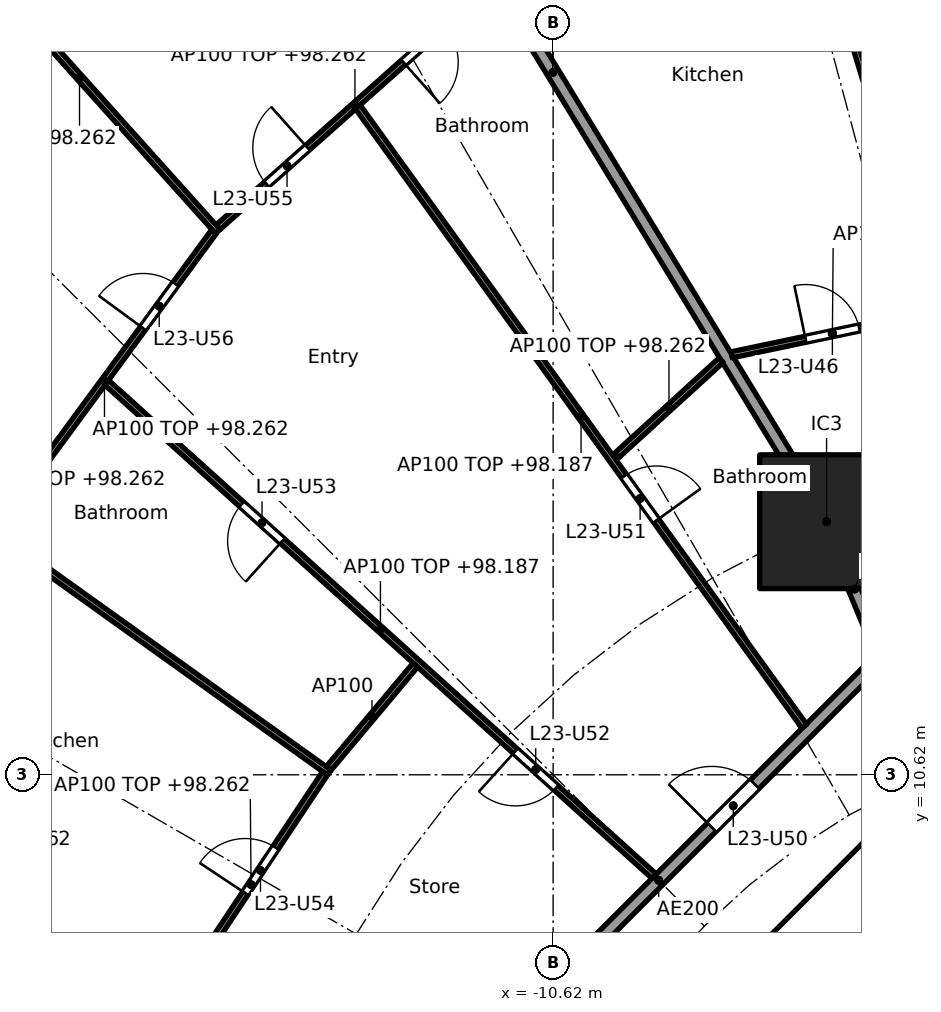
"""IFC4 building model, lengths in metres.
Left out: names, types, materials, properties, quantities, classifications, styles, units other than length and angle.
Written with IfcOpenShell. Run it as: python <this file> out.ifc"""

import sys

from ifc_helpers import new_model, si_unit, direction, frame, frame_2d, origin, origin_2d, place, context, subcontext, project, spatial, rectangle, extrude, element, fill, save


model = new_model("IFC4")
c1 = context("Model", 3, precision=1e-05, world=origin(), true_north=direction((0.0, 1.0)))
c2 = subcontext(c1, "Body", "Model", "MODEL_VIEW")
j1 = project(units=[si_unit("LENGTHUNIT", "METRE"), si_unit("PLANEANGLEUNIT", "RADIAN")], contexts=[c1])
p1 = place(None, origin())
s1 = spatial("IfcSite", under=j1, at=p1, CompositionType="ELEMENT")
p2 = place(p1, origin())
s2 = spatial("IfcBuilding", under=s1, at=p2, CompositionType="ELEMENT")
p3 = place(p2, frame((0.0, 0.0, 95.5)))
s3 = spatial("IfcBuildingStorey", under=s2, at=p3, CompositionType="ELEMENT", Elevation=95.5)
p4 = place(p3, frame((-6.123, 14.782, 0.0), z_axis=(0.0, 0.0, 1.0), x_axis=(1.0, 0.0, 0.0)))
e1 = element("IfcColumn", 1, at=p4, inside=s3, PredefinedType="COLUMN", context=c2, shape_type="SweptSolid", body=[
    extrude(rectangle(XDim=2.2, YDim=2.2, at=origin_2d()), origin(), (0.0, 0.0, 1.0), 3.7),
])
p5 = place(p3, frame((-4.613, 9.988, 0.0), z_axis=(0.0, 0.0, 1.0), x_axis=(-0.707106781187, -0.707106781187, 0.0)))
e2 = element("IfcWall", 2, at=p5, inside=s3, PredefinedType="SHEAR", context=c2, shape_type="SweptSolid", body=[
    extrude(rectangle(XDim=7.602, YDim=0.6, at=frame_2d((3.801, 0.0))), origin(), (0.0, 0.0, 1.0), 3.44),
])
p6 = place(p5, frame((0.351, 0.0, 0.0)))
e3 = element("IfcOpeningElement", 3, at=p6, cuts=e2, PredefinedType="OPENING", context=c2, shape_type="SweptSolid", body=[
    extrude(rectangle(XDim=1.1, YDim=2.1, at=frame_2d((0.55, 1.05))), frame((0.0, 0.31, 0.0), z_axis=(0.0, -1.0, 0.0), x_axis=(1.0, 0.0, 0.0)), (0.0, 0.0, 1.0), 0.62),
])
p7 = place(p3, frame((-5.243, 12.657, 0.0), z_axis=(0.0, 0.0, 1.0), x_axis=(-0.38273085373, 0.923859888513, 0.0)))
e4 = element("IfcWall", 4, at=p7, inside=s3, PredefinedType="PARTITIONING", context=c2, shape_type="SweptSolid", body=[
    extrude(rectangle(XDim=2.199, YDim=0.2, at=frame_2d((1.1, 0.0))), origin(), (0.0, 0.0, 1.0), 3.44),
])
p8 = place(p3, frame((-6.149, 14.825, 0.0), z_axis=(0.0, 0.0, 1.0), x_axis=(-0.520412862249, 0.853914780763, 0.0)))
e5 = element("IfcWall", 5, at=p8, inside=s3, PredefinedType="PARTITIONING", context=c2, shape_type="SweptSolid", body=[
    extrude(rectangle(XDim=17.202, YDim=0.2, at=frame_2d((8.601, 0.0))), origin(), (0.0, 0.0, 1.0), 2.762),
])
p9 = place(p3, frame((-14.829, 6.14, 0.0), z_axis=(0.0, 0.0, 1.0), x_axis=(-0.936597324342, 0.35040755134, 0.0)))
e6 = element("IfcWall", 6, at=p9, inside=s3, PredefinedType="PARTITIONING", context=c2, shape_type="SweptSolid", body=[
    extrude(rectangle(XDim=13.606, YDim=0.2, at=frame_2d((6.803, 0.0))), origin(), (0.0, 0.0, 1.0), 2.762),
])
p10 = place(p3, frame((-5.275, 12.494, 0.0), z_axis=(0.0, 0.0, 1.0), x_axis=(-0.707106781187, -0.707106781187, 0.0)))
e7 = element("IfcWall", 7, at=p10, inside=s3, PredefinedType="PARTITIONING", context=c2, shape_type="SweptSolid", body=[
    extrude(rectangle(XDim=10.209, YDim=0.2, at=frame_2d((5.104, 0.0))), origin(), (0.0, 0.0, 1.0), 3.44),
])
p11 = place(p10, frame((2.87, 0.0, 0.0)))
e8 = element("IfcOpeningElement", 8, at=p11, cuts=e7, PredefinedType="OPENING", context=c2, shape_type="SweptSolid", body=[
    extrude(rectangle(XDim=1.0, YDim=2.1, at=frame_2d((0.5, 1.05))), frame((0.0, 0.11, 0.0), z_axis=(0.0, -1.0, 0.0), x_axis=(1.0, 0.0, 0.0)), (0.0, 0.0, 1.0), 0.22),
])
p12 = place(p3, frame((-4.306, 18.185, 0.0), z_axis=(0.0, 0.0, 1.0), x_axis=(-0.290183838394, 0.956970919064, 0.0)))
e9 = element("IfcWall", 9, at=p12, inside=s3, PredefinedType="PARTITIONING", context=c2, shape_type="SweptSolid", body=[
    extrude(rectangle(XDim=15.015, YDim=0.1, at=frame_2d((7.508, 0.0))), origin(), (0.0, 0.0, 1.0), 2.762),
])
p13 = place(p12, frame((10.922, 0.0, 0.0)))
e10 = element("IfcOpeningElement", 10, at=p13, cuts=e9, PredefinedType="OPENING", context=c2, shape_type="SweptSolid", body=[
    extrude(rectangle(XDim=0.9, YDim=2.1, at=frame_2d((0.45, 1.05))), frame((0.0, 0.06, 0.0), z_axis=(0.0, -1.0, 0.0), x_axis=(1.0, 0.0, 0.0)), (0.0, 0.0, 1.0), 0.12),
])
p14 = place(p3, frame((-4.37, 18.223, 0.0), z_axis=(0.0, 0.0, 1.0), x_axis=(-0.978633053291, -0.205614559323, 0.0)))
e11 = element("IfcWall", 11, at=p14, inside=s3, PredefinedType="PARTITIONING", context=c2, shape_type="SweptSolid", body=[
    extrude(rectangle(XDim=3.387, YDim=0.1, at=frame_2d((1.694, 0.0))), origin(), (0.0, 0.0, 1.0), 2.762),
])
p15 = place(p14, frame((1.244, 0.0, 0.0)))
e12 = element("IfcOpeningElement", 12, at=p15, cuts=e11, PredefinedType="OPENING", context=c2, shape_type="SweptSolid", body=[
    extrude(rectangle(XDim=0.9, YDim=2.1, at=frame_2d((0.45, 1.05))), frame((0.0, 0.06, 0.0), z_axis=(0.0, -1.0, 0.0), x_axis=(1.0, 0.0, 0.0)), (0.0, 0.0, 1.0), 0.12),
])
p16 = place(p3, frame((-7.857, 17.438, 0.0), z_axis=(0.0, 0.0, 1.0), x_axis=(-0.738883513135, -0.673833179665, 0.0)))
e13 = element("IfcWall", 13, at=p16, inside=s3, PredefinedType="PARTITIONING", context=c2, shape_type="SweptSolid", body=[
    extrude(rectangle(XDim=2.323, YDim=0.1, at=frame_2d((1.162, 0.0))), origin(), (0.0, 0.0, 1.0), 2.762),
])
p17 = place(p3, frame((-11.628, 23.626, 0.0), z_axis=(0.0, 0.0, 1.0), x_axis=(-0.747429444005, -0.664341197153, 0.0)))
e14 = element("IfcWall", 14, at=p17, inside=s3, PredefinedType="PARTITIONING", context=c2, shape_type="SweptSolid", body=[
    extrude(rectangle(XDim=6.024, YDim=0.1, at=frame_2d((3.012, 0.0))), origin(), (0.0, 0.0, 1.0), 2.762),
])
p18 = place(p17, frame((4.055, 0.0, 0.0)))
e15 = element("IfcOpeningElement", 15, at=p18, cuts=e14, PredefinedType="OPENING", context=c2, shape_type="SweptSolid", body=[
    extrude(rectangle(XDim=0.9, YDim=2.1, at=frame_2d((0.45, 1.05))), frame((0.0, 0.06, 0.0), z_axis=(0.0, -1.0, 0.0), x_axis=(1.0, 0.0, 0.0)), (0.0, 0.0, 1.0), 0.12),
])
p19 = place(p17, frame((1.043, 0.0, 0.0)))
e16 = element("IfcOpeningElement", 16, at=p19, cuts=e14, PredefinedType="OPENING", context=c2, shape_type="SweptSolid", body=[
    extrude(rectangle(XDim=0.9, YDim=2.1, at=frame_2d((0.45, 1.05))), frame((0.0, 0.06, 0.0), z_axis=(0.0, -1.0, 0.0), x_axis=(1.0, 0.0, 0.0)), (0.0, 0.0, 1.0), 0.12),
])
p20 = place(p3, frame((-6.49, 11.419, 0.0), z_axis=(0.0, 0.0, 1.0), x_axis=(-0.584832823883, 0.811153849839, 0.0)))
e17 = element("IfcWall", 17, at=p20, inside=s3, PredefinedType="PARTITIONING", context=c2, shape_type="SweptSolid", body=[
    extrude(rectangle(XDim=12.553, YDim=0.1, at=frame_2d((6.277, 0.0))), origin(), (0.0, 0.0, 1.0), 2.687),
])
p21 = place(p20, frame((4.166, 0.0, 0.0)))
e18 = element("IfcOpeningElement", 18, at=p21, cuts=e17, PredefinedType="OPENING", context=c2, shape_type="SweptSolid", body=[
    extrude(rectangle(XDim=0.9, YDim=2.1, at=frame_2d((0.45, 1.05))), frame((0.0, 0.06, 0.0), z_axis=(0.0, -1.0, 0.0), x_axis=(1.0, 0.0, 0.0)), (0.0, 0.0, 1.0), 0.12),
])
p22 = place(p3, frame((-16.134, 19.554, 0.0), z_axis=(0.0, 0.0, 1.0), x_axis=(-0.667985610263, 0.74417418961, 0.0)))
e19 = element("IfcWall", 19, at=p22, inside=s3, PredefinedType="PARTITIONING", context=c2, shape_type="SweptSolid", body=[
    extrude(rectangle(XDim=6.809, YDim=0.1, at=frame_2d((3.405, 0.0))), origin(), (0.0, 0.0, 1.0), 2.762),
])
p23 = place(p3, frame((-16.197, 19.551, 0.0), z_axis=(0.0, 0.0, 1.0), x_axis=(-0.592391983588, -0.80564988536, 0.0)))
e20 = element("IfcWall", 20, at=p23, inside=s3, PredefinedType="PARTITIONING", context=c2, shape_type="SweptSolid", body=[
    extrude(rectangle(XDim=6.08, YDim=0.1, at=frame_2d((3.04, 0.0))), origin(), (0.0, 0.0, 1.0), 2.762),
])
p24 = place(p23, frame((1.07, 0.0, 0.0)))
e21 = element("IfcOpeningElement", 21, at=p24, cuts=e20, PredefinedType="OPENING", context=c2, shape_type="SweptSolid", body=[
    extrude(rectangle(XDim=0.9, YDim=2.1, at=frame_2d((0.45, 1.05))), frame((0.0, 0.06, 0.0), z_axis=(0.0, -1.0, 0.0), x_axis=(1.0, 0.0, 0.0)), (0.0, 0.0, 1.0), 0.12),
])
p25 = place(p3, frame((-8.959, 8.952, 0.0), z_axis=(0.0, 0.0, 1.0), x_axis=(-0.742679904999, 0.669646592398, 0.0)))
e22 = element("IfcWall", 22, at=p25, inside=s3, PredefinedType="PARTITIONING", context=c2, shape_type="SweptSolid", body=[
    extrude(rectangle(XDim=12.121, YDim=0.1, at=frame_2d((6.061, 0.0))), origin(), (0.0, 0.0, 1.0), 2.687),
])
p26 = place(p25, frame((2.172, 0.0, 0.0)))
e23 = element("IfcOpeningElement", 23, at=p26, cuts=e22, PredefinedType="OPENING", context=c2, shape_type="SweptSolid", body=[
    extrude(rectangle(XDim=0.9, YDim=2.1, at=frame_2d((0.45, 1.05))), frame((0.0, 0.06, 0.0), z_axis=(0.0, -1.0, 0.0), x_axis=(1.0, 0.0, 0.0)), (0.0, 0.0, 1.0), 0.12),
])
p27 = place(p25, frame((8.233, 0.0, 0.0)))
e24 = element("IfcOpeningElement", 24, at=p27, cuts=e22, PredefinedType="OPENING", context=c2, shape_type="SweptSolid", body=[
    extrude(rectangle(XDim=0.9, YDim=2.1, at=frame_2d((0.45, 1.05))), frame((0.0, 0.06, 0.0), z_axis=(0.0, -1.0, 0.0), x_axis=(1.0, 0.0, 0.0)), (0.0, 0.0, 1.0), 0.12),
])
p28 = place(p3, frame((-12.885, 12.425, 0.0), z_axis=(0.0, 0.0, 1.0), x_axis=(-0.642551826067, -0.766242227248, 0.0)))
e25 = element("IfcWall", 25, at=p28, inside=s3, PredefinedType="PARTITIONING", context=c2, shape_type="SweptSolid", body=[
    extrude(rectangle(XDim=2.219, YDim=0.1, at=frame_2d((1.109, 0.0))), origin(), (0.0, 0.0, 1.0), 3.44),
])
p29 = place(p3, frame((-14.302, 10.657, 0.0), z_axis=(0.0, 0.0, 1.0), x_axis=(-0.813183002698, 0.582008079087, 0.0)))
e26 = element("IfcWall", 26, at=p29, inside=s3, PredefinedType="PARTITIONING", context=c2, shape_type="SweptSolid", body=[
    extrude(rectangle(XDim=13.074, YDim=0.1, at=frame_2d((6.537, 0.0))), origin(), (0.0, 0.0, 1.0), 2.762),
])
p30 = place(p29, frame((9.485, 0.0, 0.0)))
e27 = element("IfcOpeningElement", 27, at=p30, cuts=e26, PredefinedType="OPENING", context=c2, shape_type="SweptSolid", body=[
    extrude(rectangle(XDim=0.9, YDim=2.1, at=frame_2d((0.45, 1.05))), frame((0.0, 0.06, 0.0), z_axis=(0.0, -1.0, 0.0), x_axis=(1.0, 0.0, 0.0)), (0.0, 0.0, 1.0), 0.12),
])
p31 = place(p3, frame((-14.371, 10.645, 0.0), z_axis=(0.0, 0.0, 1.0), x_axis=(-0.553341009285, -0.832954817168, 0.0)))
e28 = element("IfcWall", 28, at=p31, inside=s3, PredefinedType="PARTITIONING", context=c2, shape_type="SweptSolid", body=[
    extrude(rectangle(XDim=4.396, YDim=0.1, at=frame_2d((2.198, 0.0))), origin(), (0.0, 0.0, 1.0), 2.762),
])
p32 = place(p31, frame((1.469, 0.0, 0.0)))
e29 = element("IfcOpeningElement", 29, at=p32, cuts=e28, PredefinedType="OPENING", context=c2, shape_type="SweptSolid", body=[
    extrude(rectangle(XDim=0.9, YDim=2.1, at=frame_2d((0.45, 1.05))), frame((0.0, 0.06, 0.0), z_axis=(0.0, -1.0, 0.0), x_axis=(1.0, 0.0, 0.0)), (0.0, 0.0, 1.0), 0.12),
])
p33 = place(p6, origin())
e30 = element("IfcDoor", 30, at=p33, inside=s3, OperationType="SINGLE_SWING_RIGHT", PredefinedType="DOOR", context=c2, shape_type="SweptSolid", body=[
    extrude(rectangle(XDim=1.1, YDim=2.1, at=frame_2d((0.55, 1.05))), frame((0.0, 0.025, 0.0), z_axis=(0.0, -1.0, 0.0), x_axis=(1.0, 0.0, 0.0)), (0.0, 0.0, 1.0), 0.05),
])
fill(e3, e30)
p34 = place(p15, frame((0.9, 0.0, 0.0), x_axis=(-1.0, 0.0, 0.0)))
e31 = element("IfcDoor", 31, at=p34, inside=s3, OperationType="SINGLE_SWING_LEFT", PredefinedType="DOOR", context=c2, shape_type="SweptSolid", body=[
    extrude(rectangle(XDim=0.9, YDim=2.1, at=frame_2d((0.45, 1.05))), frame((0.0, 0.025, 0.0), z_axis=(0.0, -1.0, 0.0), x_axis=(1.0, 0.0, 0.0)), (0.0, 0.0, 1.0), 0.05),
])
fill(e12, e31)
p35 = place(p11, frame((1.0, 0.0, 0.0), x_axis=(-1.0, 0.0, 0.0)))
e32 = element("IfcDoor", 32, at=p35, inside=s3, OperationType="SINGLE_SWING_LEFT", PredefinedType="DOOR", context=c2, shape_type="SweptSolid", body=[
    extrude(rectangle(XDim=1.0, YDim=2.1, at=frame_2d((0.5, 1.05))), frame((0.0, 0.025, 0.0), z_axis=(0.0, -1.0, 0.0), x_axis=(1.0, 0.0, 0.0)), (0.0, 0.0, 1.0), 0.05),
])
fill(e8, e32)
p36 = place(p21, frame((0.9, 0.0, 0.0), x_axis=(-1.0, 0.0, 0.0)))
e33 = element("IfcDoor", 33, at=p36, inside=s3, OperationType="SINGLE_SWING_RIGHT", PredefinedType="DOOR", context=c2, shape_type="SweptSolid", body=[
    extrude(rectangle(XDim=0.9, YDim=2.1, at=frame_2d((0.45, 1.05))), frame((0.0, 0.025, 0.0), z_axis=(0.0, -1.0, 0.0), x_axis=(1.0, 0.0, 0.0)), (0.0, 0.0, 1.0), 0.05),
])
fill(e18, e33)
p37 = place(p26, origin())
e34 = element("IfcDoor", 34, at=p37, inside=s3, OperationType="SINGLE_SWING_RIGHT", PredefinedType="DOOR", context=c2, shape_type="SweptSolid", body=[
    extrude(rectangle(XDim=0.9, YDim=2.1, at=frame_2d((0.45, 1.05))), frame((0.0, 0.025, 0.0), z_axis=(0.0, -1.0, 0.0), x_axis=(1.0, 0.0, 0.0)), (0.0, 0.0, 1.0), 0.05),
])
fill(e23, e34)
p38 = place(p27, origin())
e35 = element("IfcDoor", 35, at=p38, inside=s3, OperationType="SINGLE_SWING_LEFT", PredefinedType="DOOR", context=c2, shape_type="SweptSolid", body=[
    extrude(rectangle(XDim=0.9, YDim=2.1, at=frame_2d((0.45, 1.05))), frame((0.0, 0.025, 0.0), z_axis=(0.0, -1.0, 0.0), x_axis=(1.0, 0.0, 0.0)), (0.0, 0.0, 1.0), 0.05),
])
fill(e24, e35)
p39 = place(p32, frame((0.9, 0.0, 0.0), x_axis=(-1.0, 0.0, 0.0)))
e36 = element("IfcDoor", 36, at=p39, inside=s3, OperationType="SINGLE_SWING_LEFT", PredefinedType="DOOR", context=c2, shape_type="SweptSolid", body=[
    extrude(rectangle(XDim=0.9, YDim=2.1, at=frame_2d((0.45, 1.05))), frame((0.0, 0.025, 0.0), z_axis=(0.0, -1.0, 0.0), x_axis=(1.0, 0.0, 0.0)), (0.0, 0.0, 1.0), 0.05),
])
fill(e29, e36)
p40 = place(p18, frame((0.9, 0.0, 0.0), x_axis=(-1.0, 0.0, 0.0)))
e37 = element("IfcDoor", 37, at=p40, inside=s3, OperationType="SINGLE_SWING_RIGHT", PredefinedType="DOOR", context=c2, shape_type="SweptSolid", body=[
    extrude(rectangle(XDim=0.9, YDim=2.1, at=frame_2d((0.45, 1.05))), frame((0.0, 0.025, 0.0), z_axis=(0.0, -1.0, 0.0), x_axis=(1.0, 0.0, 0.0)), (0.0, 0.0, 1.0), 0.05),
])
fill(e15, e37)
p41 = place(p24, frame((0.9, 0.0, 0.0), x_axis=(-1.0, 0.0, 0.0)))
e38 = element("IfcDoor", 38, at=p41, inside=s3, OperationType="SINGLE_SWING_LEFT", PredefinedType="DOOR", context=c2, shape_type="SweptSolid", body=[
    extrude(rectangle(XDim=0.9, YDim=2.1, at=frame_2d((0.45, 1.05))), frame((0.0, 0.025, 0.0), z_axis=(0.0, -1.0, 0.0), x_axis=(1.0, 0.0, 0.0)), (0.0, 0.0, 1.0), 0.05),
])
fill(e21, e38)
p42 = place(p19, origin())
e39 = element("IfcDoor", 39, at=p42, inside=s3, OperationType="SINGLE_SWING_RIGHT", PredefinedType="DOOR", context=c2, shape_type="SweptSolid", body=[
    extrude(rectangle(XDim=0.9, YDim=2.1, at=frame_2d((0.45, 1.05))), frame((0.0, 0.025, 0.0), z_axis=(0.0, -1.0, 0.0), x_axis=(1.0, 0.0, 0.0)), (0.0, 0.0, 1.0), 0.05),
])
fill(e16, e39)
save(model, sys.argv[1])
